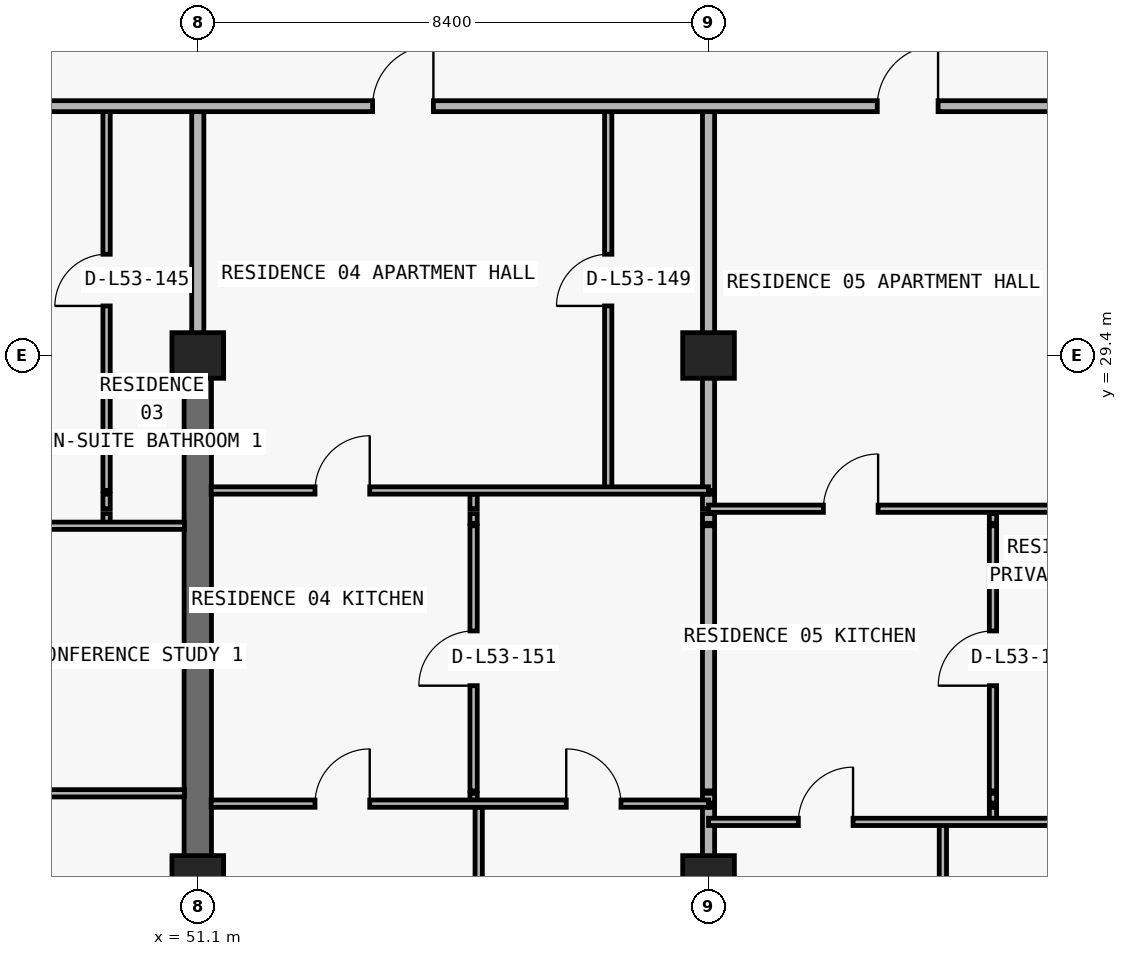
"""IFC4 building model, lengths in metres.
Left out: names, types, materials, properties, quantities, classifications, styles, units other than length and angle.
Written with IfcOpenShell. Run it as: python <this file> out.ifc"""

import sys

from ifc_helpers import new_model, si_unit, direction, frame, frame_2d, origin, origin_2d, place, context, subcontext, project, spatial, rectangle, extrude, element, fill, save


model = new_model("IFC4")
c1 = context("Model", 3, precision=1e-05, world=origin(), true_north=direction((0.0, 1.0)))
c2 = subcontext(c1, "Body", "Model", "MODEL_VIEW")
j1 = project(units=[si_unit("LENGTHUNIT", "METRE"), si_unit("PLANEANGLEUNIT", "RADIAN")], contexts=[c1])
p1 = place(None, origin())
s1 = spatial("IfcSite", under=j1, at=p1, CompositionType="ELEMENT")
p2 = place(p1, origin())
s2 = spatial("IfcBuilding", under=s1, at=p2, CompositionType="ELEMENT")
p3 = place(p2, frame((0.0, 0.0, 191.7)))
s3 = spatial("IfcBuildingStorey", under=s2, at=p3, CompositionType="ELEMENT", Elevation=191.7)
for number, where, z_axis, x_axis in (
    (1, (51.1, 20.8, 0.0), (0.0, 0.0, 1.0), (1.0, 0.0, 0.0)),
    (2, (59.5, 20.8, 0.0), (0.0, 0.0, 1.0), (1.0, 0.0, 0.0)),
    (3, (51.1, 29.4, 0.0), (0.0, 0.0, 1.0), (1.0, 0.0, 0.0)),
    (4, (59.5, 29.4, 0.0), (0.0, 0.0, 1.0), (1.0, 0.0, 0.0)),
):
    element("IfcColumn", number, at=place(p3, frame(where, z_axis=z_axis, x_axis=x_axis)), inside=s3, PredefinedType="COLUMN", context=c2, shape_type="SweptSolid", body=[
        extrude(rectangle(XDim=0.85, YDim=0.75, at=origin_2d()), origin(), (0.0, 0.0, 1.0), 3.05),
    ])
p4 = place(p3, frame((51.1, 20.8, 0.0), z_axis=(0.0, 0.0, 1.0), x_axis=(0.0, 1.0, 0.0)))
e5 = element("IfcWall", 5, at=p4, inside=s3, PredefinedType="SHEAR", context=c2, shape_type="SweptSolid", body=[
    extrude(rectangle(XDim=8.6, YDim=0.45, at=frame_2d((4.3, 0.0))), origin(), (0.0, 0.0, 1.0), 3.05),
])
p5 = place(p3, frame((49.6, 26.64, 0.0), z_axis=(0.0, 0.0, 1.0), x_axis=(0.0, 1.0, 0.0)))
e6 = element("IfcWall", 6, at=p5, inside=s3, PredefinedType="PARTITIONING", context=c2, shape_type="SweptSolid", body=[
    extrude(rectangle(XDim=0.16, YDim=0.12, at=frame_2d((0.08, 0.0))), origin(), (0.0, 0.0, 1.0), 3.05),
])
p6 = place(p3, frame((49.6, 26.88, 0.0), z_axis=(0.0, 0.0, 1.0), x_axis=(0.0, 1.0, 0.0)))
e7 = element("IfcWall", 7, at=p6, inside=s3, PredefinedType="PARTITIONING", context=c2, shape_type="SweptSolid", body=[
    extrude(rectangle(XDim=0.24, YDim=0.12, at=frame_2d((0.12, 0.0))), origin(), (0.0, 0.0, 1.0), 3.05),
])
p7 = place(p3, frame((49.6, 27.18, 0.0), z_axis=(0.0, 0.0, 1.0), x_axis=(0.0, 1.0, 0.0)))
e8 = element("IfcWall", 8, at=p7, inside=s3, PredefinedType="PARTITIONING", context=c2, shape_type="SweptSolid", body=[
    extrude(rectangle(XDim=6.32, YDim=0.12, at=frame_2d((3.16, 0.0))), origin(), (0.0, 0.0, 1.0), 3.05),
])
p8 = place(p7, frame((3.035, 0.0, 0.0)))
e9 = element("IfcOpeningElement", 9, at=p8, cuts=e8, PredefinedType="OPENING", context=c2, shape_type="SweptSolid", body=[
    extrude(rectangle(XDim=0.85, YDim=2.1, at=frame_2d((0.425, 1.05))), frame((0.0, 0.07, 0.0), z_axis=(0.0, -1.0, 0.0), x_axis=(1.0, 0.0, 0.0)), (0.0, 0.0, 1.0), 0.14),
])
p9 = place(p3, frame((51.1, 29.405, 0.0), z_axis=(0.0, 0.0, 1.0), x_axis=(0.0, 1.0, 0.0)))
e10 = element("IfcWall", 10, at=p9, inside=s3, PredefinedType="PARTITIONING", context=c2, shape_type="SweptSolid", body=[
    extrude(rectangle(XDim=4.095, YDim=0.2, at=frame_2d((2.047, 0.0))), origin(), (0.0, 0.0, 1.0), 2.335),
])
p10 = place(p3, frame((55.636, 22.04, 0.0), z_axis=(0.0, 0.0, 1.0), x_axis=(0.0, 1.0, 0.0)))
e11 = element("IfcWall", 11, at=p10, inside=s3, PredefinedType="PARTITIONING", context=c2, shape_type="SweptSolid", body=[
    extrude(rectangle(XDim=0.16, YDim=0.12, at=frame_2d((0.08, 0.0))), origin(), (0.0, 0.0, 1.0), 3.05),
])
p11 = place(p3, frame((55.636, 22.24, 0.0), z_axis=(0.0, 0.0, 1.0), x_axis=(0.0, 1.0, 0.0)))
e12 = element("IfcWall", 12, at=p11, inside=s3, PredefinedType="PARTITIONING", context=c2, shape_type="SweptSolid", body=[
    extrude(rectangle(XDim=4.36, YDim=0.12, at=frame_2d((2.18, 0.0))), origin(), (0.0, 0.0, 1.0), 3.05),
])
p12 = place(p11, frame((1.73, 0.0, 0.0)))
e13 = element("IfcOpeningElement", 13, at=p12, cuts=e12, PredefinedType="OPENING", context=c2, shape_type="SweptSolid", body=[
    extrude(rectangle(XDim=0.9, YDim=2.15, at=frame_2d((0.45, 1.075))), frame((0.0, 0.07, 0.0), z_axis=(0.0, -1.0, 0.0), x_axis=(1.0, 0.0, 0.0)), (0.0, 0.0, 1.0), 0.14),
])
p13 = place(p3, frame((55.636, 26.64, 0.0), z_axis=(0.0, 0.0, 1.0), x_axis=(0.0, 1.0, 0.0)))
e14 = element("IfcWall", 14, at=p13, inside=s3, PredefinedType="PARTITIONING", context=c2, shape_type="SweptSolid", body=[
    extrude(rectangle(XDim=0.16, YDim=0.12, at=frame_2d((0.08, 0.0))), origin(), (0.0, 0.0, 1.0), 3.05),
])
p14 = place(p3, frame((55.636, 26.88, 0.0), z_axis=(0.0, 0.0, 1.0), x_axis=(0.0, 1.0, 0.0)))
e15 = element("IfcWall", 15, at=p14, inside=s3, PredefinedType="PARTITIONING", context=c2, shape_type="SweptSolid", body=[
    extrude(rectangle(XDim=0.24, YDim=0.12, at=frame_2d((0.12, 0.0))), origin(), (0.0, 0.0, 1.0), 3.05),
])
p15 = place(p3, frame((55.72, 11.24, 0.0), z_axis=(0.0, 0.0, 1.0), x_axis=(0.0, 1.0, 0.0)))
e16 = element("IfcWall", 16, at=p15, inside=s3, PredefinedType="PARTITIONING", context=c2, shape_type="SweptSolid", body=[
    extrude(rectangle(XDim=10.73, YDim=0.12, at=frame_2d((5.365, 0.0))), origin(), (0.0, 0.0, 1.0), 3.05),
])
p16 = place(p3, frame((57.85, 27.18, 0.0), z_axis=(0.0, 0.0, 1.0), x_axis=(0.0, 1.0, 0.0)))
e17 = element("IfcWall", 17, at=p16, inside=s3, PredefinedType="PARTITIONING", context=c2, shape_type="SweptSolid", body=[
    extrude(rectangle(XDim=6.32, YDim=0.12, at=frame_2d((3.16, 0.0))), origin(), (0.0, 0.0, 1.0), 3.05),
])
p17 = place(p16, frame((3.035, 0.0, 0.0)))
e18 = element("IfcOpeningElement", 18, at=p17, cuts=e17, PredefinedType="OPENING", context=c2, shape_type="SweptSolid", body=[
    extrude(rectangle(XDim=0.85, YDim=2.1, at=frame_2d((0.425, 1.05))), frame((0.0, 0.07, 0.0), z_axis=(0.0, -1.0, 0.0), x_axis=(1.0, 0.0, 0.0)), (0.0, 0.0, 1.0), 0.14),
])
p18 = place(p3, frame((59.5, 11.24, 0.0), z_axis=(0.0, 0.0, 1.0), x_axis=(0.0, 1.0, 0.0)))
e19 = element("IfcWall", 19, at=p18, inside=s3, PredefinedType="PARTITIONING", context=c2, shape_type="SweptSolid", body=[
    extrude(rectangle(XDim=10.73, YDim=0.2, at=frame_2d((5.365, 0.0))), origin(), (0.0, 0.0, 1.0), 2.263),
])
p19 = place(p3, frame((59.5, 22.04, 0.0), z_axis=(0.0, 0.0, 1.0), x_axis=(0.0, 1.0, 0.0)))
e20 = element("IfcWall", 20, at=p19, inside=s3, PredefinedType="PARTITIONING", context=c2, shape_type="SweptSolid", body=[
    extrude(rectangle(XDim=0.16, YDim=0.2, at=frame_2d((0.08, 0.0))), origin(), (0.0, 0.0, 1.0), 2.263),
])
p20 = place(p3, frame((59.5, 22.24, 0.0), z_axis=(0.0, 0.0, 1.0), x_axis=(0.0, 1.0, 0.0)))
e21 = element("IfcWall", 21, at=p20, inside=s3, PredefinedType="PARTITIONING", context=c2, shape_type="SweptSolid", body=[
    extrude(rectangle(XDim=4.36, YDim=0.2, at=frame_2d((2.18, 0.0))), origin(), (0.0, 0.0, 1.0), 2.263),
])
p21 = place(p3, frame((59.5, 26.64, 0.0), z_axis=(0.0, 0.0, 1.0), x_axis=(0.0, 1.0, 0.0)))
e22 = element("IfcWall", 22, at=p21, inside=s3, PredefinedType="PARTITIONING", context=c2, shape_type="SweptSolid", body=[
    extrude(rectangle(XDim=0.16, YDim=0.2, at=frame_2d((0.08, 0.0))), origin(), (0.0, 0.0, 1.0), 2.263),
])
p22 = place(p3, frame((59.5, 26.88, 0.0), z_axis=(0.0, 0.0, 1.0), x_axis=(0.0, 1.0, 0.0)))
e23 = element("IfcWall", 23, at=p22, inside=s3, PredefinedType="PARTITIONING", context=c2, shape_type="SweptSolid", body=[
    extrude(rectangle(XDim=0.24, YDim=0.2, at=frame_2d((0.12, 0.0))), origin(), (0.0, 0.0, 1.0), 2.263),
])
p23 = place(p3, frame((59.5, 27.18, 0.0), z_axis=(0.0, 0.0, 1.0), x_axis=(0.0, 1.0, 0.0)))
e24 = element("IfcWall", 24, at=p23, inside=s3, PredefinedType="PARTITIONING", context=c2, shape_type="SweptSolid", body=[
    extrude(rectangle(XDim=6.32, YDim=0.2, at=frame_2d((3.16, 0.0))), origin(), (0.0, 0.0, 1.0), 2.263),
])
p24 = place(p3, frame((63.354, 11.24, 0.0), z_axis=(0.0, 0.0, 1.0), x_axis=(0.0, 1.0, 0.0)))
e25 = element("IfcWall", 25, at=p24, inside=s3, PredefinedType="PARTITIONING", context=c2, shape_type="SweptSolid", body=[
    extrude(rectangle(XDim=10.49, YDim=0.12, at=frame_2d((5.245, 0.0))), origin(), (0.0, 0.0, 1.0), 3.05),
])
p25 = place(p3, frame((64.178, 21.73, 0.0), z_axis=(0.0, 0.0, 1.0), x_axis=(0.0, 1.0, 0.0)))
e26 = element("IfcWall", 26, at=p25, inside=s3, PredefinedType="PARTITIONING", context=c2, shape_type="SweptSolid", body=[
    extrude(rectangle(XDim=0.24, YDim=0.12, at=frame_2d((0.12, 0.0))), origin(), (0.0, 0.0, 1.0), 3.05),
])
p26 = place(p3, frame((64.178, 22.04, 0.0), z_axis=(0.0, 0.0, 1.0), x_axis=(0.0, 1.0, 0.0)))
e27 = element("IfcWall", 27, at=p26, inside=s3, PredefinedType="PARTITIONING", context=c2, shape_type="SweptSolid", body=[
    extrude(rectangle(XDim=0.16, YDim=0.12, at=frame_2d((0.08, 0.0))), origin(), (0.0, 0.0, 1.0), 3.05),
])
p27 = place(p3, frame((64.178, 22.24, 0.0), z_axis=(0.0, 0.0, 1.0), x_axis=(0.0, 1.0, 0.0)))
e28 = element("IfcWall", 28, at=p27, inside=s3, PredefinedType="PARTITIONING", context=c2, shape_type="SweptSolid", body=[
    extrude(rectangle(XDim=4.36, YDim=0.12, at=frame_2d((2.18, 0.0))), origin(), (0.0, 0.0, 1.0), 3.05),
])
p28 = place(p27, frame((1.73, 0.0, 0.0)))
e29 = element("IfcOpeningElement", 29, at=p28, cuts=e28, PredefinedType="OPENING", context=c2, shape_type="SweptSolid", body=[
    extrude(rectangle(XDim=0.9, YDim=2.15, at=frame_2d((0.45, 1.075))), frame((0.0, 0.07, 0.0), z_axis=(0.0, -1.0, 0.0), x_axis=(1.0, 0.0, 0.0)), (0.0, 0.0, 1.0), 0.14),
])
p29 = place(p3, frame((64.178, 26.64, 0.0), z_axis=(0.0, 0.0, 1.0), x_axis=(0.0, 1.0, 0.0)))
e30 = element("IfcWall", 30, at=p29, inside=s3, PredefinedType="PARTITIONING", context=c2, shape_type="SweptSolid", body=[
    extrude(rectangle(XDim=0.16, YDim=0.12, at=frame_2d((0.08, 0.0))), origin(), (0.0, 0.0, 1.0), 3.05),
])
p30 = place(p3, frame((59.5, 21.73, 0.0), z_axis=(0.0, 0.0, 1.0), x_axis=(1.0, 0.0, 0.0)))
e31 = element("IfcWall", 31, at=p30, inside=s3, PredefinedType="PARTITIONING", context=c2, shape_type="SweptSolid", body=[
    extrude(rectangle(XDim=8.2, YDim=0.12, at=frame_2d((4.1, 0.0))), origin(), (0.0, 0.0, 1.0), 3.05),
])
p31 = place(p30, frame((1.477, 0.0, 0.0)))
e32 = element("IfcOpeningElement", 32, at=p31, cuts=e31, PredefinedType="OPENING", context=c2, shape_type="SweptSolid", body=[
    extrude(rectangle(XDim=0.9, YDim=2.15, at=frame_2d((0.45, 1.075))), frame((0.0, 0.07, 0.0), z_axis=(0.0, -1.0, 0.0), x_axis=(1.0, 0.0, 0.0)), (0.0, 0.0, 1.0), 0.14),
])
p32 = place(p30, frame((5.989, 0.0, 0.0)))
e33 = element("IfcOpeningElement", 33, at=p32, cuts=e31, PredefinedType="OPENING", context=c2, shape_type="SweptSolid", body=[
    extrude(rectangle(XDim=0.9, YDim=2.15, at=frame_2d((0.45, 1.075))), frame((0.0, 0.07, 0.0), z_axis=(0.0, -1.0, 0.0), x_axis=(1.0, 0.0, 0.0)), (0.0, 0.0, 1.0), 0.14),
])
p33 = place(p3, frame((51.32, 22.03, 0.0), z_axis=(0.0, 0.0, 1.0), x_axis=(1.0, 0.0, 0.0)))
e34 = element("IfcWall", 34, at=p33, inside=s3, PredefinedType="PARTITIONING", context=c2, shape_type="SweptSolid", body=[
    extrude(rectangle(XDim=8.18, YDim=0.12, at=frame_2d((4.09, 0.0))), origin(), (0.0, 0.0, 1.0), 3.05),
])
p34 = place(p33, frame((1.708, 0.0, 0.0)))
e35 = element("IfcOpeningElement", 35, at=p34, cuts=e34, PredefinedType="OPENING", context=c2, shape_type="SweptSolid", body=[
    extrude(rectangle(XDim=0.9, YDim=2.15, at=frame_2d((0.45, 1.075))), frame((0.0, 0.07, 0.0), z_axis=(0.0, -1.0, 0.0), x_axis=(1.0, 0.0, 0.0)), (0.0, 0.0, 1.0), 0.14),
])
p35 = place(p33, frame((5.84, 0.0, 0.0)))
e36 = element("IfcOpeningElement", 36, at=p35, cuts=e34, PredefinedType="OPENING", context=c2, shape_type="SweptSolid", body=[
    extrude(rectangle(XDim=0.9, YDim=2.15, at=frame_2d((0.45, 1.075))), frame((0.0, 0.07, 0.0), z_axis=(0.0, -1.0, 0.0), x_axis=(1.0, 0.0, 0.0)), (0.0, 0.0, 1.0), 0.14),
])
p36 = place(p3, frame((42.705, 22.2, 0.0), z_axis=(0.0, 0.0, 1.0), x_axis=(1.0, 0.0, 0.0)))
e37 = element("IfcWall", 37, at=p36, inside=s3, PredefinedType="PARTITIONING", context=c2, shape_type="SweptSolid", body=[
    extrude(rectangle(XDim=8.175, YDim=0.12, at=frame_2d((4.087, 0.0))), origin(), (0.0, 0.0, 1.0), 3.05),
])
p37 = place(p36, frame((3.637, 0.0, 0.0)))
e38 = element("IfcOpeningElement", 38, at=p37, cuts=e37, PredefinedType="OPENING", context=c2, shape_type="SweptSolid", body=[
    extrude(rectangle(XDim=0.9, YDim=2.15, at=frame_2d((0.45, 1.075))), frame((0.0, 0.07, 0.0), z_axis=(0.0, -1.0, 0.0), x_axis=(1.0, 0.0, 0.0)), (0.0, 0.0, 1.0), 0.14),
])
p38 = place(p3, frame((42.7, 26.6, 0.0), z_axis=(0.0, 0.0, 1.0), x_axis=(1.0, 0.0, 0.0)))
e39 = element("IfcWall", 39, at=p38, inside=s3, PredefinedType="PARTITIONING", context=c2, shape_type="SweptSolid", body=[
    extrude(rectangle(XDim=8.18, YDim=0.12, at=frame_2d((4.09, 0.0))), origin(), (0.0, 0.0, 1.0), 3.05),
])
p39 = place(p38, frame((3.0, 0.0, 0.0)))
e40 = element("IfcOpeningElement", 40, at=p39, cuts=e39, PredefinedType="OPENING", context=c2, shape_type="SweptSolid", body=[
    extrude(rectangle(XDim=0.9, YDim=2.15, at=frame_2d((0.45, 1.075))), frame((0.0, 0.07, 0.0), z_axis=(0.0, -1.0, 0.0), x_axis=(1.0, 0.0, 0.0)), (0.0, 0.0, 1.0), 0.14),
])
p40 = place(p3, frame((59.5, 26.88, 0.0), z_axis=(0.0, 0.0, 1.0), x_axis=(1.0, 0.0, 0.0)))
e41 = element("IfcWall", 41, at=p40, inside=s3, PredefinedType="PARTITIONING", context=c2, shape_type="SweptSolid", body=[
    extrude(rectangle(XDim=8.2, YDim=0.12, at=frame_2d((4.1, 0.0))), origin(), (0.0, 0.0, 1.0), 3.05),
])
p41 = place(p40, frame((1.889, 0.0, 0.0)))
e42 = element("IfcOpeningElement", 42, at=p41, cuts=e41, PredefinedType="OPENING", context=c2, shape_type="SweptSolid", body=[
    extrude(rectangle(XDim=0.9, YDim=2.15, at=frame_2d((0.45, 1.075))), frame((0.0, 0.07, 0.0), z_axis=(0.0, -1.0, 0.0), x_axis=(1.0, 0.0, 0.0)), (0.0, 0.0, 1.0), 0.14),
])
p42 = place(p3, frame((51.32, 27.18, 0.0), z_axis=(0.0, 0.0, 1.0), x_axis=(1.0, 0.0, 0.0)))
e43 = element("IfcWall", 43, at=p42, inside=s3, PredefinedType="PARTITIONING", context=c2, shape_type="SweptSolid", body=[
    extrude(rectangle(XDim=8.18, YDim=0.12, at=frame_2d((4.09, 0.0))), origin(), (0.0, 0.0, 1.0), 3.05),
])
p43 = place(p42, frame((1.708, 0.0, 0.0)))
e44 = element("IfcOpeningElement", 44, at=p43, cuts=e43, PredefinedType="OPENING", context=c2, shape_type="SweptSolid", body=[
    extrude(rectangle(XDim=0.9, YDim=2.15, at=frame_2d((0.45, 1.075))), frame((0.0, 0.07, 0.0), z_axis=(0.0, -1.0, 0.0), x_axis=(1.0, 0.0, 0.0)), (0.0, 0.0, 1.0), 0.14),
])
p44 = place(p3, frame((31.4, 33.5, 0.0), z_axis=(0.0, 0.0, 1.0), x_axis=(1.0, 0.0, 0.0)))
e45 = element("IfcWall", 45, at=p44, inside=s3, PredefinedType="PARTITIONING", context=c2, shape_type="SweptSolid", body=[
    extrude(rectangle(XDim=36.3, YDim=0.18, at=frame_2d((18.15, 0.0))), origin(), (0.0, 0.0, 1.0), 3.05),
])
p45 = place(p44, frame((6.231, 0.0, 0.0)))
e46 = element("IfcOpeningElement", 46, at=p45, cuts=e45, PredefinedType="OPENING", context=c2, shape_type="SweptSolid", body=[
    extrude(rectangle(XDim=1.0, YDim=2.2, at=frame_2d((0.5, 1.1))), frame((0.0, 0.1, 0.0), z_axis=(0.0, -1.0, 0.0), x_axis=(1.0, 0.0, 0.0)), (0.0, 0.0, 1.0), 0.2),
])
p46 = place(p44, frame((22.575, 0.0, 0.0)))
e47 = element("IfcOpeningElement", 47, at=p46, cuts=e45, PredefinedType="OPENING", context=c2, shape_type="SweptSolid", body=[
    extrude(rectangle(XDim=1.0, YDim=2.2, at=frame_2d((0.5, 1.1))), frame((0.0, 0.1, 0.0), z_axis=(0.0, -1.0, 0.0), x_axis=(1.0, 0.0, 0.0)), (0.0, 0.0, 1.0), 0.2),
])
p47 = place(p44, frame((30.875, 0.0, 0.0)))
e48 = element("IfcOpeningElement", 48, at=p47, cuts=e45, PredefinedType="OPENING", context=c2, shape_type="SweptSolid", body=[
    extrude(rectangle(XDim=1.0, YDim=2.2, at=frame_2d((0.5, 1.1))), frame((0.0, 0.1, 0.0), z_axis=(0.0, -1.0, 0.0), x_axis=(1.0, 0.0, 0.0)), (0.0, 0.0, 1.0), 0.2),
])
p48 = place(p8, origin())
e49 = element("IfcDoor", 49, at=p48, inside=s3, OperationType="SINGLE_SWING_LEFT", PredefinedType="DOOR", context=c2, shape_type="SweptSolid", body=[
    extrude(rectangle(XDim=0.85, YDim=2.1, at=frame_2d((0.425, 1.05))), frame((0.0, 0.025, 0.0), z_axis=(0.0, -1.0, 0.0), x_axis=(1.0, 0.0, 0.0)), (0.0, 0.0, 1.0), 0.05),
])
fill(e9, e49)
p49 = place(p46, origin())
e50 = element("IfcDoor", 50, at=p49, inside=s3, OperationType="SINGLE_SWING_RIGHT", PredefinedType="DOOR", context=c2, shape_type="SweptSolid", body=[
    extrude(rectangle(XDim=1.0, YDim=2.2, at=frame_2d((0.5, 1.1))), frame((0.0, 0.025, 0.0), z_axis=(0.0, -1.0, 0.0), x_axis=(1.0, 0.0, 0.0)), (0.0, 0.0, 1.0), 0.05),
])
fill(e47, e50)
p50 = place(p17, origin())
e51 = element("IfcDoor", 51, at=p50, inside=s3, OperationType="SINGLE_SWING_LEFT", PredefinedType="DOOR", context=c2, shape_type="SweptSolid", body=[
    extrude(rectangle(XDim=0.85, YDim=2.1, at=frame_2d((0.425, 1.05))), frame((0.0, 0.025, 0.0), z_axis=(0.0, -1.0, 0.0), x_axis=(1.0, 0.0, 0.0)), (0.0, 0.0, 1.0), 0.05),
])
fill(e18, e51)
p51 = place(p43, origin())
e52 = element("IfcDoor", 52, at=p51, inside=s3, OperationType="SINGLE_SWING_RIGHT", PredefinedType="DOOR", context=c2, shape_type="SweptSolid", body=[
    extrude(rectangle(XDim=0.9, YDim=2.15, at=frame_2d((0.45, 1.075))), frame((0.0, 0.025, 0.0), z_axis=(0.0, -1.0, 0.0), x_axis=(1.0, 0.0, 0.0)), (0.0, 0.0, 1.0), 0.05),
])
fill(e44, e52)
p52 = place(p12, origin())
e53 = element("IfcDoor", 53, at=p52, inside=s3, OperationType="SINGLE_SWING_LEFT", PredefinedType="DOOR", context=c2, shape_type="SweptSolid", body=[
    extrude(rectangle(XDim=0.9, YDim=2.15, at=frame_2d((0.45, 1.075))), frame((0.0, 0.025, 0.0), z_axis=(0.0, -1.0, 0.0), x_axis=(1.0, 0.0, 0.0)), (0.0, 0.0, 1.0), 0.05),
])
fill(e13, e53)
p53 = place(p34, origin())
e54 = element("IfcDoor", 54, at=p53, inside=s3, OperationType="SINGLE_SWING_RIGHT", PredefinedType="DOOR", context=c2, shape_type="SweptSolid", body=[
    extrude(rectangle(XDim=0.9, YDim=2.15, at=frame_2d((0.45, 1.075))), frame((0.0, 0.025, 0.0), z_axis=(0.0, -1.0, 0.0), x_axis=(1.0, 0.0, 0.0)), (0.0, 0.0, 1.0), 0.05),
])
fill(e35, e54)
p54 = place(p35, origin())
e55 = element("IfcDoor", 55, at=p54, inside=s3, OperationType="SINGLE_SWING_LEFT", PredefinedType="DOOR", context=c2, shape_type="SweptSolid", body=[
    extrude(rectangle(XDim=0.9, YDim=2.15, at=frame_2d((0.45, 1.075))), frame((0.0, 0.025, 0.0), z_axis=(0.0, -1.0, 0.0), x_axis=(1.0, 0.0, 0.0)), (0.0, 0.0, 1.0), 0.05),
])
fill(e36, e55)
p55 = place(p47, origin())
e56 = element("IfcDoor", 56, at=p55, inside=s3, OperationType="SINGLE_SWING_RIGHT", PredefinedType="DOOR", context=c2, shape_type="SweptSolid", body=[
    extrude(rectangle(XDim=1.0, YDim=2.2, at=frame_2d((0.5, 1.1))), frame((0.0, 0.025, 0.0), z_axis=(0.0, -1.0, 0.0), x_axis=(1.0, 0.0, 0.0)), (0.0, 0.0, 1.0), 0.05),
])
fill(e48, e56)
p56 = place(p41, origin())
e57 = element("IfcDoor", 57, at=p56, inside=s3, OperationType="SINGLE_SWING_RIGHT", PredefinedType="DOOR", context=c2, shape_type="SweptSolid", body=[
    extrude(rectangle(XDim=0.9, YDim=2.15, at=frame_2d((0.45, 1.075))), frame((0.0, 0.025, 0.0), z_axis=(0.0, -1.0, 0.0), x_axis=(1.0, 0.0, 0.0)), (0.0, 0.0, 1.0), 0.05),
])
fill(e42, e57)
p57 = place(p28, origin())
e58 = element("IfcDoor", 58, at=p57, inside=s3, OperationType="SINGLE_SWING_LEFT", PredefinedType="DOOR", context=c2, shape_type="SweptSolid", body=[
    extrude(rectangle(XDim=0.9, YDim=2.15, at=frame_2d((0.45, 1.075))), frame((0.0, 0.025, 0.0), z_axis=(0.0, -1.0, 0.0), x_axis=(1.0, 0.0, 0.0)), (0.0, 0.0, 1.0), 0.05),
])
fill(e29, e58)
p58 = place(p31, origin())
e59 = element("IfcDoor", 59, at=p58, inside=s3, OperationType="SINGLE_SWING_RIGHT", PredefinedType="DOOR", context=c2, shape_type="SweptSolid", body=[
    extrude(rectangle(XDim=0.9, YDim=2.15, at=frame_2d((0.45, 1.075))), frame((0.0, 0.025, 0.0), z_axis=(0.0, -1.0, 0.0), x_axis=(1.0, 0.0, 0.0)), (0.0, 0.0, 1.0), 0.05),
])
fill(e32, e59)
save(model, sys.argv[1])
